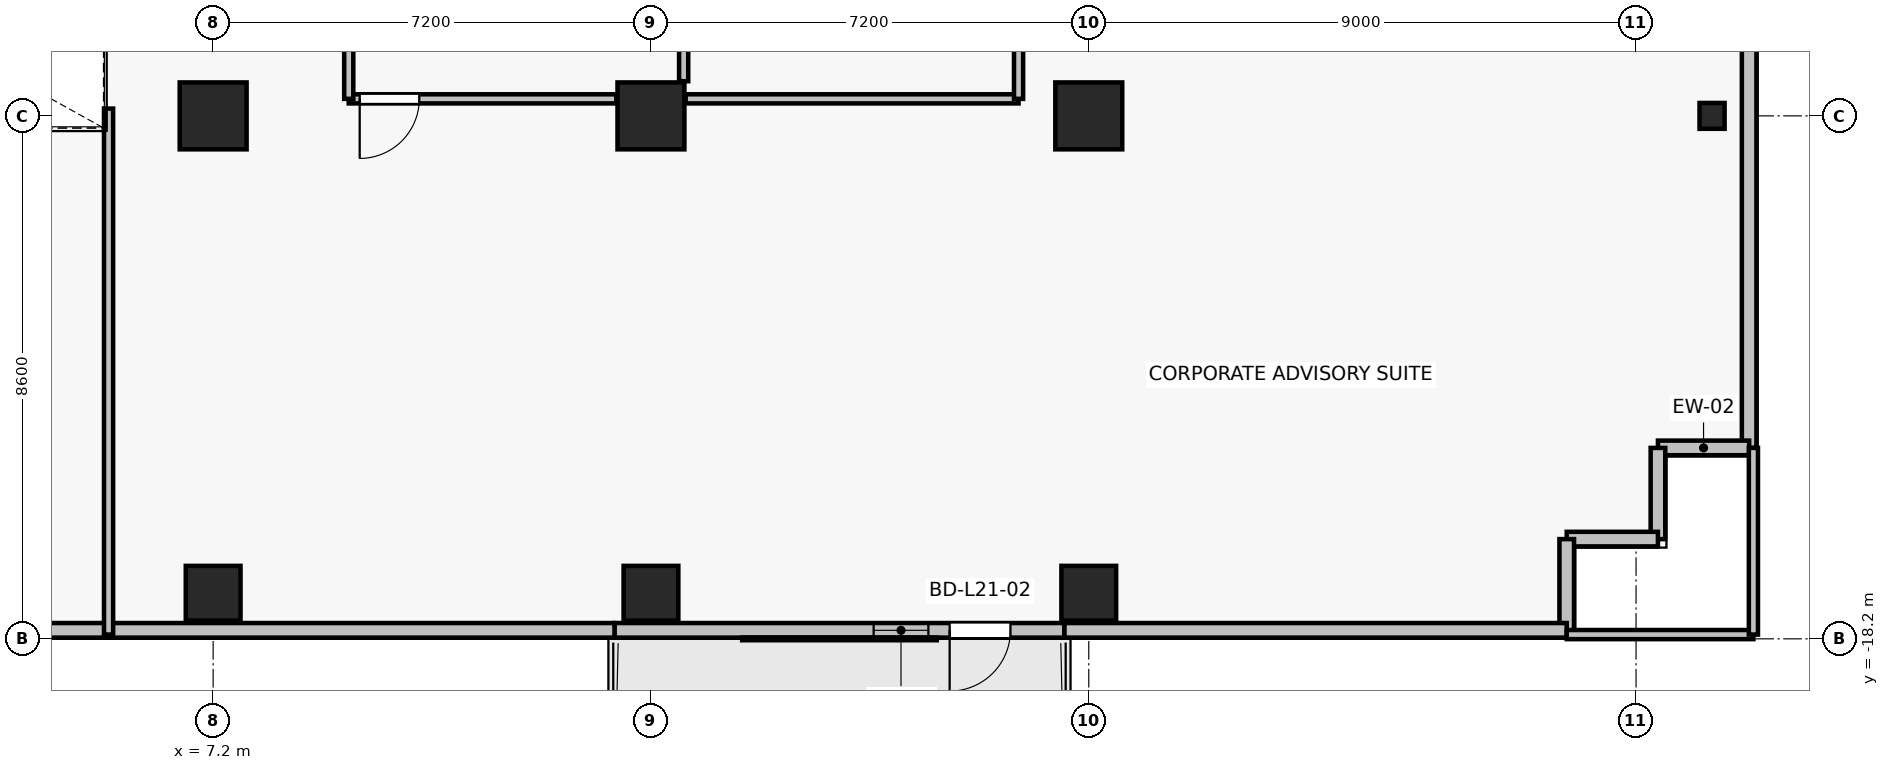
"""IFC4 building model, lengths in metres.
Left out: names, types, materials, properties, quantities, classifications, styles, units other than length and angle.
Written with IfcOpenShell. Run it as: python <this file> out.ifc"""

import sys

from ifc_helpers import new_model, si_unit, direction, frame, frame_2d, origin, origin_2d, place, context, subcontext, project, spatial, rectangle, i_section, extrude, source, transform, mapped, element, fill, save


model = new_model("IFC4")
c1 = context("Model", 3, precision=1e-05, world=origin(), true_north=direction((0.0, 1.0)))
c2 = subcontext(c1, "Body", "Model", "MODEL_VIEW")
j1 = project(units=[si_unit("LENGTHUNIT", "METRE"), si_unit("PLANEANGLEUNIT", "RADIAN")], contexts=[c1])
p1 = place(None, origin())
s1 = spatial("IfcSite", under=j1, at=p1, CompositionType="ELEMENT")
p2 = place(p1, origin())
s2 = spatial("IfcBuilding", under=s1, at=p2, CompositionType="ELEMENT")
p3 = place(p2, frame((0.0, 0.0, 76.9)))
s3 = spatial("IfcBuildingStorey", under=s2, at=p3, CompositionType="ELEMENT", Elevation=76.9)
for number, where, z_axis, x_axis in (
    (1, (7.2, -9.6, 0.0), (0.0, 0.0, 1.0), (1.0, 0.0, 0.0)),
    (2, (14.4, -9.6, 0.0), (0.0, 0.0, 1.0), (1.0, 0.0, 0.0)),
    (3, (21.6, -9.6, 0.0), (0.0, 0.0, 1.0), (1.0, 0.0, 0.0)),
):
    element("IfcColumn", number, at=place(p3, frame(where, z_axis=z_axis, x_axis=x_axis)), inside=s3, PredefinedType="COLUMN", context=c2, shape_type="SweptSolid", body=[
        extrude(rectangle(XDim=1.1, YDim=1.1, at=origin_2d()), origin(), (0.0, 0.0, 1.0), 3.3),
    ])
for number, where, z_axis, x_axis in (
    (4, (7.2, -17.45, 0.0), (0.0, 0.0, 1.0), (1.0, 0.0, 0.0)),
    (5, (14.4, -17.45, 0.0), (0.0, 0.0, 1.0), (1.0, 0.0, 0.0)),
    (6, (21.6, -17.45, 0.0), (0.0, 0.0, 1.0), (1.0, 0.0, 0.0)),
):
    element("IfcColumn", number, at=place(p3, frame(where, z_axis=z_axis, x_axis=x_axis)), inside=s3, PredefinedType="COLUMN", context=c2, shape_type="SweptSolid", body=[
        extrude(rectangle(XDim=0.9, YDim=0.9, at=origin_2d()), origin(), (0.0, 0.0, 1.0), 3.3),
    ])
p4 = place(p3, frame((31.85, -9.6, 0.0), z_axis=(0.0, 0.0, 1.0), x_axis=(1.0, 0.0, 0.0)))
e7 = element("IfcColumn", 7, at=p4, inside=s3, PredefinedType="COLUMN", context=c2, shape_type="SweptSolid", body=[
    extrude(i_section(OverallWidth=0.412, OverallDepth=0.425, WebThickness=0.026, FlangeThickness=0.039, FilletRadius=0.015, at=origin_2d()), origin(), (0.0, 0.0, 1.0), 3.3),
])
p5 = place(p3, frame((21.2, -18.06, 0.0), z_axis=(0.0, 0.0, 1.0), x_axis=(-1.0, 0.0, 0.0)))
e8 = element("IfcWall", 8, at=p5, inside=s3, PredefinedType="SOLIDWALL", context=c2, shape_type="SweptSolid", body=[
    extrude(rectangle(XDim=7.4, YDim=0.24, at=frame_2d((3.7, 0.0))), origin(), (0.0, 0.0, 1.0), 3.05),
])
p6 = place(p5, frame((0.888, 0.0, 0.0)))
e9 = element("IfcOpeningElement", 9, at=p6, cuts=e8, PredefinedType="OPENING", context=c2, shape_type="SweptSolid", body=[
    extrude(rectangle(XDim=1.0, YDim=2.2, at=frame_2d((0.5, 1.1))), frame((0.0, 0.13, 0.0), z_axis=(0.0, -1.0, 0.0), x_axis=(1.0, 0.0, 0.0)), (0.0, 0.0, 1.0), 0.26),
])
p7 = place(p5, frame((2.238, 0.0, 0.85)))
e10 = element("IfcOpeningElement", 10, at=p7, cuts=e8, PredefinedType="OPENING", context=c2, shape_type="SweptSolid", body=[
    extrude(rectangle(XDim=0.9, YDim=1.35, at=frame_2d((0.45, 0.675))), frame((0.0, 0.13, 0.0), z_axis=(0.0, -1.0, 0.0), x_axis=(1.0, 0.0, 0.0)), (0.0, 0.0, 1.0), 0.26),
])
p8 = place(p3, frame((32.46, -15.06, 0.0), z_axis=(0.0, 0.0, 1.0), x_axis=(0.0, 1.0, 0.0)))
e11 = element("IfcWall", 11, at=p8, inside=s3, PredefinedType="SOLIDWALL", context=c2, shape_type="SweptSolid", body=[
    extrude(rectangle(XDim=6.76, YDim=0.24, at=frame_2d((3.38, 0.0))), origin(), (0.0, 0.0, 1.0), 3.05),
])
for number, where, z_axis, x_axis in (
    (12, (30.96, -15.06, 0.0), (0.0, 0.0, 1.0), (1.0, 0.0, 0.0)),
    (13, (30.96, -16.56, 0.0), (0.0, 0.0, 1.0), (0.0, 1.0, 0.0)),
    (14, (29.46, -16.56, 0.0), (0.0, 0.0, 1.0), (1.0, 0.0, 0.0)),
    (15, (29.46, -18.06, 0.0), (0.0, 0.0, 1.0), (0.0, 1.0, 0.0)),
):
    element("IfcWall", number, at=place(p3, frame(where, z_axis=z_axis, x_axis=x_axis)), inside=s3, PredefinedType="SOLIDWALL", context=c2, shape_type="SweptSolid", body=[
        extrude(rectangle(XDim=1.5, YDim=0.24, at=frame_2d((0.75, 0.0))), origin(), (0.0, 0.0, 1.0), 3.05),
    ])
p9 = place(p3, frame((21.2, -18.06, 0.0), z_axis=(0.0, 0.0, 1.0), x_axis=(1.0, 0.0, 0.0)))
e16 = element("IfcWall", 16, at=p9, inside=s3, PredefinedType="SOLIDWALL", context=c2, shape_type="SweptSolid", body=[
    extrude(rectangle(XDim=8.26, YDim=0.24, at=frame_2d((4.13, 0.0))), origin(), (0.0, 0.0, 1.0), 3.05),
])
p10 = place(p3, frame((3.34, -18.06, 0.0), z_axis=(0.0, 0.0, 1.0), x_axis=(1.0, 0.0, 0.0)))
e17 = element("IfcWall", 17, at=p10, inside=s3, PredefinedType="SOLIDWALL", context=c2, shape_type="SweptSolid", body=[
    extrude(rectangle(XDim=10.46, YDim=0.24, at=frame_2d((5.23, 0.0))), origin(), (0.0, 0.0, 1.0), 3.05),
])
p11 = place(p3, frame((13.83, -9.32, 0.0), z_axis=(0.0, 0.0, 1.0), x_axis=(-1.0, 0.0, 0.0)))
e18 = element("IfcWall", 18, at=p11, inside=s3, PredefinedType="PARTITIONING", context=c2, shape_type="SweptSolid", body=[
    extrude(rectangle(XDim=4.4, YDim=0.15, at=frame_2d((2.2, 0.0))), origin(), (0.0, 0.0, 1.0), 2.44),
])
p12 = place(p11, frame((3.24, 0.0, 0.0)))
e19 = element("IfcOpeningElement", 19, at=p12, cuts=e18, PredefinedType="OPENING", context=c2, shape_type="SweptSolid", body=[
    extrude(rectangle(XDim=0.98, YDim=2.15, at=frame_2d((0.49, 1.075))), frame((0.0, 0.085, 0.0), z_axis=(0.0, -1.0, 0.0), x_axis=(1.0, 0.0, 0.0)), (0.0, 0.0, 1.0), 0.17),
])
p13 = place(p3, frame((9.43, -9.32, 0.0), z_axis=(0.0, 0.0, 1.0), x_axis=(0.0, 1.0, 0.0)))
e20 = element("IfcWall", 20, at=p13, inside=s3, PredefinedType="PARTITIONING", context=c2, shape_type="SweptSolid", body=[
    extrude(rectangle(XDim=5.49, YDim=0.15, at=frame_2d((2.745, 0.0))), origin(), (0.0, 0.0, 1.0), 2.44),
])
p14 = place(p3, frame((14.938, -3.83, 0.0), z_axis=(0.0, 0.0, 1.0), x_axis=(0.0, -1.0, 0.0)))
e21 = element("IfcWall", 21, at=p14, inside=s3, PredefinedType="PARTITIONING", context=c2, shape_type="SweptSolid", body=[
    extrude(rectangle(XDim=5.2, YDim=0.15, at=frame_2d((2.6, 0.0))), origin(), (0.0, 0.0, 1.0), 2.54),
])
p15 = place(p3, frame((20.445, -9.32, 0.0), z_axis=(0.0, 0.0, 1.0), x_axis=(-1.0, 0.0, 0.0)))
e22 = element("IfcWall", 22, at=p15, inside=s3, PredefinedType="PARTITIONING", context=c2, shape_type="SweptSolid", body=[
    extrude(rectangle(XDim=5.475, YDim=0.15, at=frame_2d((2.738, 0.0))), origin(), (0.0, 0.0, 1.0), 2.44),
])
p16 = place(p3, frame((20.445, -3.83, 0.0), z_axis=(0.0, 0.0, 1.0), x_axis=(0.0, -1.0, 0.0)))
e23 = element("IfcWall", 23, at=p16, inside=s3, PredefinedType="PARTITIONING", context=c2, shape_type="SweptSolid", body=[
    extrude(rectangle(XDim=5.49, YDim=0.15, at=frame_2d((2.745, 0.0))), origin(), (0.0, 0.0, 1.0), 2.44),
])
p17 = place(p3, frame((32.53, -18.13, 0.0), z_axis=(0.0, 0.0, 1.0), x_axis=(-1.0, 0.0, 0.0)))
e24 = element("IfcWall", 24, at=p17, inside=s3, PredefinedType="PARTITIONING", context=c2, shape_type="SweptSolid", body=[
    extrude(rectangle(XDim=3.07, YDim=0.15, at=frame_2d((1.535, 0.0))), origin(), (0.0, 0.0, 1.0), 3.05),
])
p18 = place(p3, frame((5.48, -18.13, 0.0), z_axis=(0.0, 0.0, 1.0), x_axis=(0.0, 1.0, 0.0)))
e25 = element("IfcWall", 25, at=p18, inside=s3, PredefinedType="PARTITIONING", context=c2, shape_type="SweptSolid", body=[
    extrude(rectangle(XDim=8.65, YDim=0.15, at=frame_2d((4.325, 0.0))), origin(), (0.0, 0.0, 1.0), 2.44),
])
p19 = place(p3, frame((32.53, -15.06, 0.0), z_axis=(0.0, 0.0, 1.0), x_axis=(0.0, -1.0, 0.0)))
e26 = element("IfcWall", 26, at=p19, inside=s3, PredefinedType="PARTITIONING", context=c2, shape_type="SweptSolid", body=[
    extrude(rectangle(XDim=3.07, YDim=0.15, at=frame_2d((1.535, 0.0))), origin(), (0.0, 0.0, 1.0), 3.05),
])
m1 = source(origin(), c2, "Body", "SweptSolid", [
    extrude(rectangle(XDim=1.0, YDim=2.2, at=frame_2d((0.5, 1.1))), frame((0.0, 0.025, 0.0), z_axis=(0.0, -1.0, 0.0), x_axis=(1.0, 0.0, 0.0)), (0.0, 0.0, 1.0), 0.05),
])
p20 = place(p6, origin())
e27 = element("IfcDoor", 27, at=p20, inside=s3, OperationType="SINGLE_SWING_RIGHT", PredefinedType="DOOR", context=c2, shape_type="MappedRepresentation", body=[
    mapped(m1, transform((0.0, 0.0, 0.0), x_axis=(1.0, 0.0, 0.0), y_axis=(0.0, 1.0, 0.0), z_axis=(0.0, 0.0, 1.0), scale=1.0)),
])
fill(e9, e27)
m2 = source(origin(), c2, "Body", "SweptSolid", [
    extrude(rectangle(XDim=0.9, YDim=1.35, at=frame_2d((0.45, 0.675))), frame((0.0, 0.03, 0.0), z_axis=(0.0, -1.0, 0.0), x_axis=(1.0, 0.0, 0.0)), (0.0, 0.0, 1.0), 0.06),
])
p21 = place(p7, origin())
e28 = element("IfcWindow", 28, at=p21, inside=s3, PartitioningType="SINGLE_PANEL", PredefinedType="WINDOW", context=c2, shape_type="MappedRepresentation", body=[
    mapped(m2, transform((0.0, 0.0, 0.0), x_axis=(1.0, 0.0, 0.0), y_axis=(0.0, 1.0, 0.0), z_axis=(0.0, 0.0, 1.0), scale=1.0)),
])
fill(e10, e28)
m3 = source(origin(), c2, "Body", "SweptSolid", [
    extrude(rectangle(XDim=0.98, YDim=2.15, at=frame_2d((0.49, 1.075))), frame((0.0, 0.025, 0.0), z_axis=(0.0, -1.0, 0.0), x_axis=(1.0, 0.0, 0.0)), (0.0, 0.0, 1.0), 0.05),
])
p22 = place(p12, origin())
e29 = element("IfcDoor", 29, at=p22, inside=s3, OperationType="SINGLE_SWING_RIGHT", PredefinedType="DOOR", context=c2, shape_type="MappedRepresentation", body=[
    mapped(m3, transform((0.0, 0.0, 0.0), x_axis=(1.0, 0.0, 0.0), y_axis=(0.0, 1.0, 0.0), z_axis=(0.0, 0.0, 1.0), scale=1.0)),
])
fill(e19, e29)
save(model, sys.argv[1])
